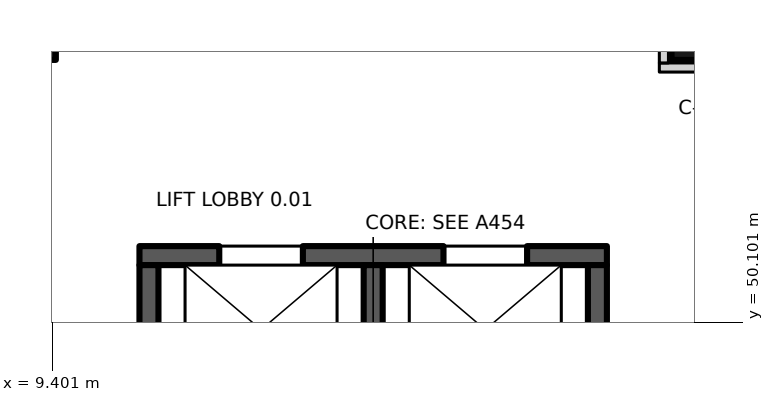
"""IFC4 building model, lengths in metres.
Left out: names, types, materials, properties, quantities, classifications, styles, units other than length and angle.
Written with IfcOpenShell. Run it as: python <this file> out.ifc"""

import sys

from ifc_helpers import new_model, si_unit, direction, frame, frame_2d, origin, origin_2d, place, context, subcontext, project, spatial, rectangle, extrude, element, fill, save


model = new_model("IFC4")
c1 = context("Model", 3, precision=1e-05, world=origin(), true_north=direction((0.0, 1.0)))
c2 = subcontext(c1, "Body", "Model", "MODEL_VIEW")
j1 = project(units=[si_unit("LENGTHUNIT", "METRE"), si_unit("PLANEANGLEUNIT", "RADIAN")], contexts=[c1])
p1 = place(None, origin())
s1 = spatial("IfcSite", under=j1, at=p1, CompositionType="ELEMENT")
p2 = place(p1, origin())
s2 = spatial("IfcBuilding", under=s1, at=p2, CompositionType="ELEMENT")
p3 = place(p2, origin())
s3 = spatial("IfcBuildingStorey", under=s2, at=p3, CompositionType="ELEMENT", Elevation=0.0)
for number, where, z_axis, x_axis in (
    (1, (9.0, 54.0, 0.0), (0.0, 0.0, 1.0), (1.0, 0.0, 0.0)),
    (2, (18.0, 54.0, 0.0), (0.0, 0.0, 1.0), (1.0, 0.0, 0.0)),
):
    element("IfcColumn", number, at=place(p3, frame(where, z_axis=z_axis, x_axis=x_axis)), inside=s3, PredefinedType="COLUMN", context=c2, shape_type="SweptSolid", body=[
        extrude(rectangle(XDim=0.9, YDim=0.9, at=origin_2d()), origin(), (0.0, 0.0, 1.0), 6.0),
    ])
p4 = place(p3, frame((10.55, 50.975, 0.0), z_axis=(0.0, 0.0, 1.0), x_axis=(1.0, 0.0, 0.0)))
e3 = element("IfcWall", 3, at=p4, inside=s3, PredefinedType="SHEAR", context=c2, shape_type="SweptSolid", body=[
    extrude(rectangle(XDim=6.15, YDim=0.25, at=frame_2d((3.075, 0.0))), origin(), (0.0, 0.0, 1.0), 6.0),
])
p5 = place(p4, frame((1.05, 0.0, 0.0)))
e4 = element("IfcOpeningElement", 4, at=p5, cuts=e3, PredefinedType="OPENING", context=c2, shape_type="SweptSolid", body=[
    extrude(rectangle(XDim=1.1, YDim=2.1, at=frame_2d((0.55, 1.05))), frame((0.0, 0.135, 0.0), z_axis=(0.0, -1.0, 0.0), x_axis=(1.0, 0.0, 0.0)), (0.0, 0.0, 1.0), 0.27),
])
p6 = place(p4, frame((4.0, 0.0, 0.0)))
e5 = element("IfcOpeningElement", 5, at=p6, cuts=e3, PredefinedType="OPENING", context=c2, shape_type="SweptSolid", body=[
    extrude(rectangle(XDim=1.1, YDim=2.1, at=frame_2d((0.55, 1.05))), frame((0.0, 0.135, 0.0), z_axis=(0.0, -1.0, 0.0), x_axis=(1.0, 0.0, 0.0)), (0.0, 0.0, 1.0), 0.27),
])
for number, where, z_axis, x_axis in (
    (6, (10.675, 48.15, 0.0), (0.0, 0.0, 1.0), (0.0, 1.0, 0.0)),
    (7, (13.625, 48.15, 0.0), (0.0, 0.0, 1.0), (0.0, 1.0, 0.0)),
    (8, (16.575, 48.15, 0.0), (0.0, 0.0, 1.0), (0.0, 1.0, 0.0)),
):
    element("IfcWall", number, at=place(p3, frame(where, z_axis=z_axis, x_axis=x_axis)), inside=s3, PredefinedType="SHEAR", context=c2, shape_type="SweptSolid", body=[
        extrude(rectangle(XDim=2.7, YDim=0.25, at=frame_2d((1.35, 0.0))), origin(), (0.0, 0.0, 1.0), 6.0),
    ])
p7 = place(p3, frame((17.39, 53.45, 0.0), z_axis=(0.0, 0.0, 1.0), x_axis=(1.0, 0.0, 0.0)))
e9 = element("IfcWall", 9, at=p7, inside=s3, PredefinedType="PARTITIONING", context=c2, shape_type="SweptSolid", body=[
    extrude(rectangle(XDim=28.22, YDim=0.12, at=frame_2d((14.11, 0.0))), origin(), (0.0, 0.0, 1.0), 5.2),
])
p8 = place(p7, frame((4.21, 0.0, 0.0)))
e10 = element("IfcOpeningElement", 10, at=p8, cuts=e9, PredefinedType="OPENING", context=c2, shape_type="SweptSolid", body=[
    extrude(rectangle(XDim=1.8, YDim=2.1, at=frame_2d((0.9, 1.05))), frame((0.0, 0.07, 0.0), z_axis=(0.0, -1.0, 0.0), x_axis=(1.0, 0.0, 0.0)), (0.0, 0.0, 1.0), 0.14),
])
p9 = place(p7, frame((22.21, 0.0, 0.0)))
e11 = element("IfcOpeningElement", 11, at=p9, cuts=e9, PredefinedType="OPENING", context=c2, shape_type="SweptSolid", body=[
    extrude(rectangle(XDim=1.8, YDim=2.1, at=frame_2d((0.9, 1.05))), frame((0.0, 0.07, 0.0), z_axis=(0.0, -1.0, 0.0), x_axis=(1.0, 0.0, 0.0)), (0.0, 0.0, 1.0), 0.14),
])
p10 = place(p3, frame((17.45, 53.51, 0.0), z_axis=(0.0, 0.0, 1.0), x_axis=(0.0, 1.0, 0.0)))
e12 = element("IfcWall", 12, at=p10, inside=s3, PredefinedType="PARTITIONING", context=c2, shape_type="SweptSolid", body=[
    extrude(rectangle(XDim=36.415, YDim=0.12, at=frame_2d((18.208, 0.0))), origin(), (0.0, 0.0, 1.0), 5.2),
])
p11 = place(p10, frame((14.89, 0.0, 0.0), z_axis=(0.0, 0.0, 1.0), x_axis=(-1.0, 0.0, 0.0)))
e13 = element("IfcOpeningElement", 13, at=p11, cuts=e12, PredefinedType="OPENING", context=c2, shape_type="SweptSolid", body=[
    extrude(rectangle(XDim=1.8, YDim=2.1, at=frame_2d((0.9, 1.05))), frame((0.0, 0.07, 0.0), z_axis=(0.0, -1.0, 0.0), x_axis=(1.0, 0.0, 0.0)), (0.0, 0.0, 1.0), 0.14),
])
p12 = place(p5, origin())
e14 = element("IfcDoor", 14, at=p12, inside=s3, OperationType="DOUBLE_DOOR_SLIDING", PredefinedType="DOOR", context=c2, shape_type="SweptSolid", body=[
    extrude(rectangle(XDim=1.1, YDim=2.1, at=frame_2d((0.55, 1.05))), frame((0.0, 0.025, 0.0), z_axis=(0.0, -1.0, 0.0), x_axis=(1.0, 0.0, 0.0)), (0.0, 0.0, 1.0), 0.05),
])
fill(e4, e14)
p13 = place(p6, origin())
e15 = element("IfcDoor", 15, at=p13, inside=s3, OperationType="DOUBLE_DOOR_SLIDING", PredefinedType="DOOR", context=c2, shape_type="SweptSolid", body=[
    extrude(rectangle(XDim=1.1, YDim=2.1, at=frame_2d((0.55, 1.05))), frame((0.0, 0.025, 0.0), z_axis=(0.0, -1.0, 0.0), x_axis=(1.0, 0.0, 0.0)), (0.0, 0.0, 1.0), 0.05),
])
fill(e5, e15)
save(model, sys.argv[1])
